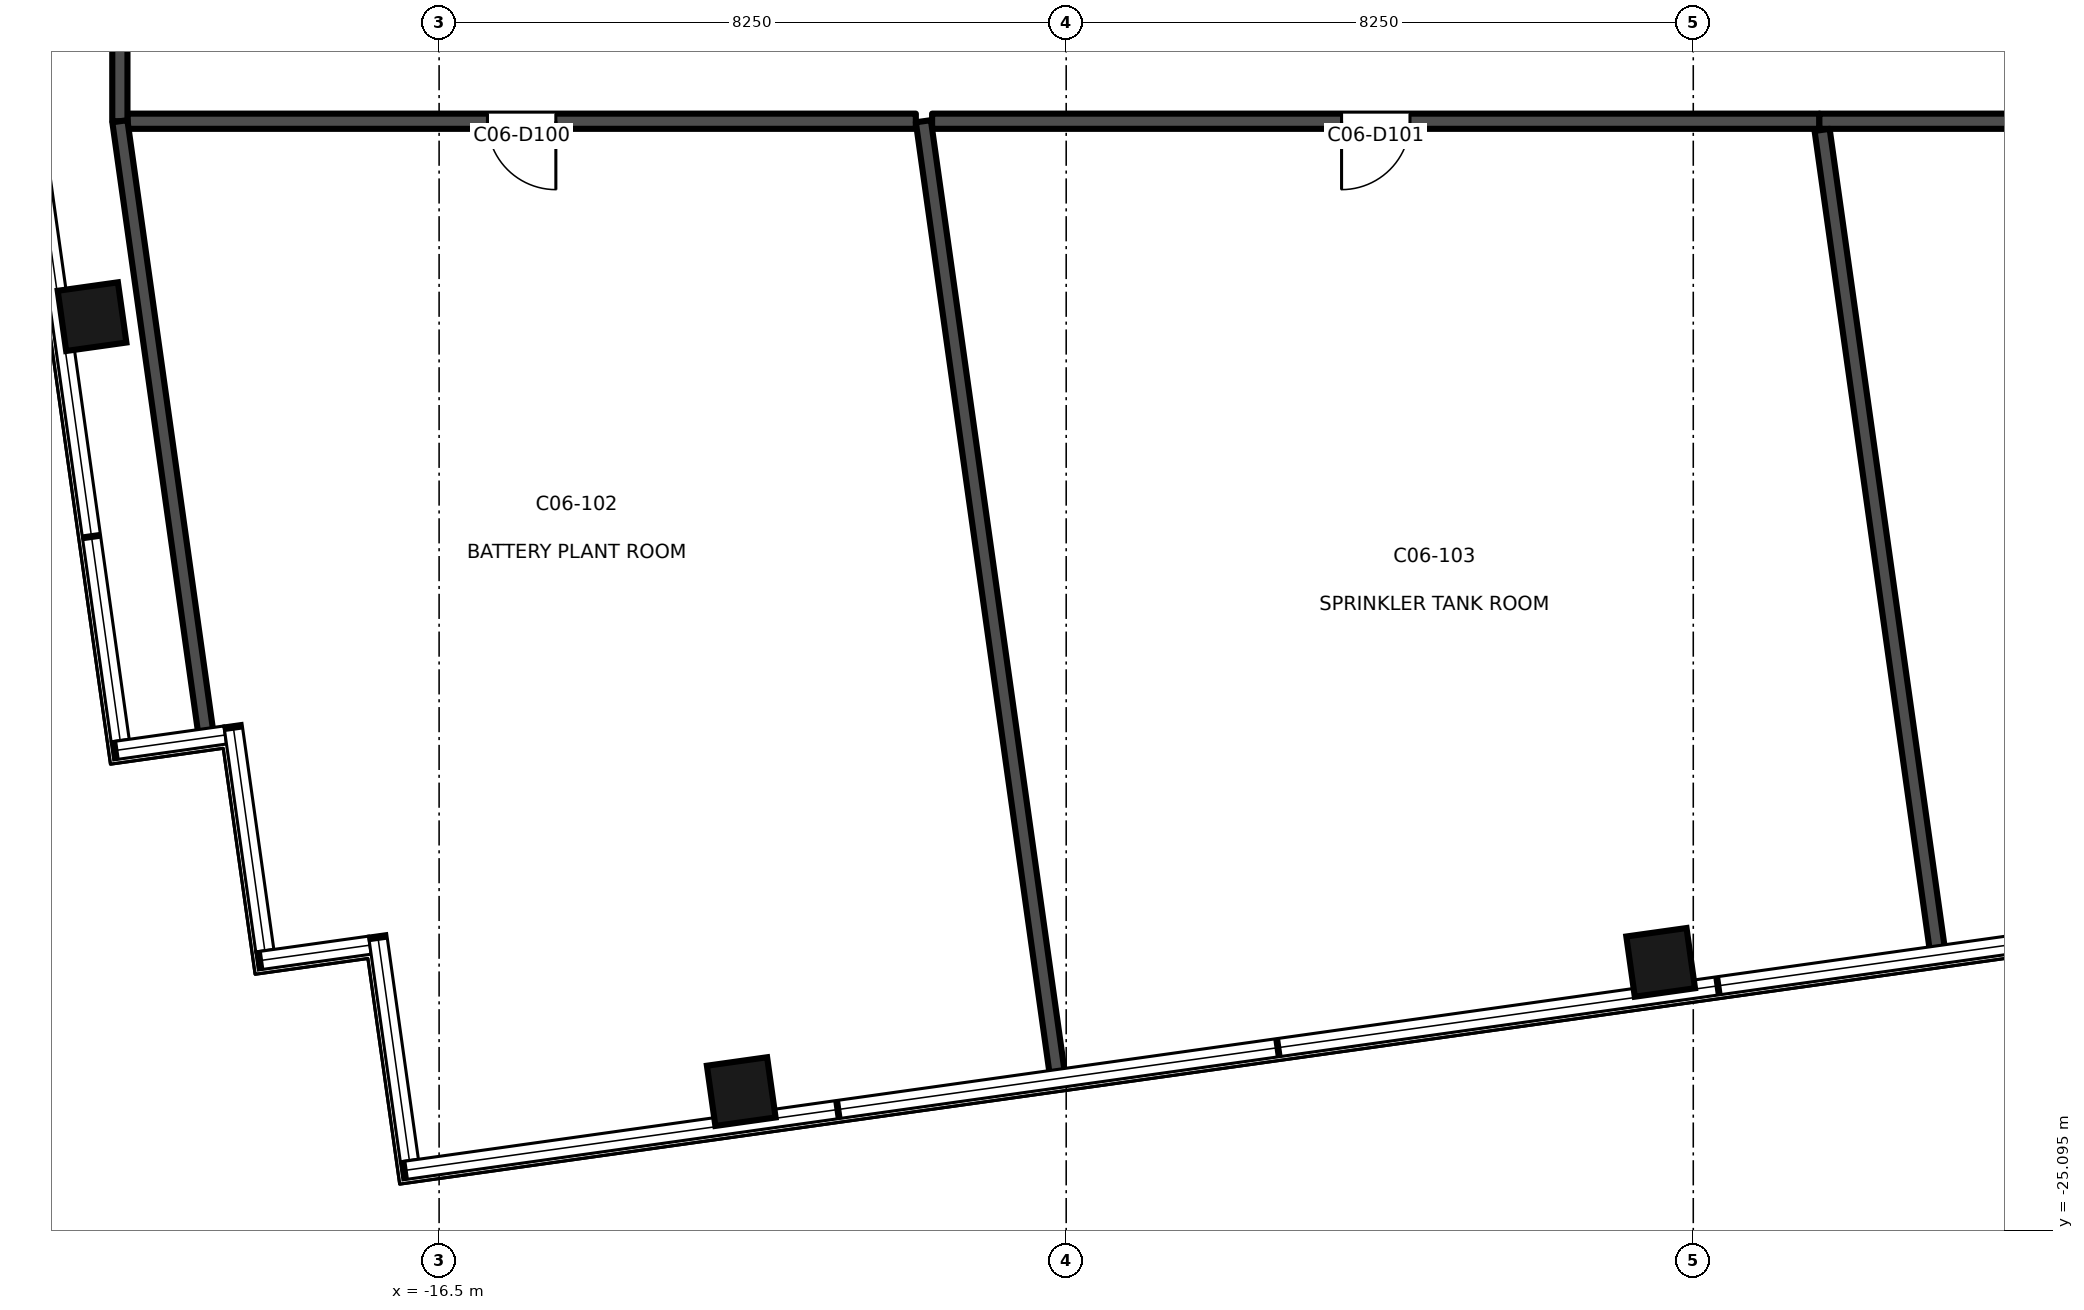
"""IFC4 building model, lengths in metres.
Left out: names, types, materials, properties, quantities, classifications, styles, units other than length and angle.
Written with IfcOpenShell. Run it as: python <this file> out.ifc"""

import sys

from ifc_helpers import new_model, si_unit, direction, frame, frame_2d, origin, origin_2d, place, context, subcontext, project, spatial, rectangle, extrude, element, fill, save


model = new_model("IFC4")
c1 = context("Model", 3, precision=1e-05, world=origin(), true_north=direction((0.0, 1.0)))
c2 = subcontext(c1, "Body", "Model", "MODEL_VIEW")
j1 = project(units=[si_unit("LENGTHUNIT", "METRE"), si_unit("PLANEANGLEUNIT", "RADIAN")], contexts=[c1])
p1 = place(None, origin())
s1 = spatial("IfcSite", under=j1, at=p1, CompositionType="ELEMENT")
p2 = place(p1, origin())
s2 = spatial("IfcBuilding", under=s1, at=p2, CompositionType="ELEMENT")
p3 = place(p2, frame((0.0, 0.0, 312.3)))
s3 = spatial("IfcBuildingStorey", under=s2, at=p3, CompositionType="ELEMENT", Elevation=312.3)
for number, where, z_axis, x_axis in (
    (1, (-12.525, -23.266, -0.2), (0.0, 0.0, 1.0), (0.99, 0.139, 0.0)),
    (2, (-0.429, -21.566, -0.2), (0.0, 0.0, 1.0), (0.99, 0.139, 0.0)),
    (3, (-21.066, -13.071, -0.2), (0.0, 0.0, 1.0), (-0.139, 0.99, 0.0)),
):
    element("IfcColumn", number, at=place(p3, frame(where, z_axis=z_axis, x_axis=x_axis)), inside=s3, PredefinedType="COLUMN", context=c2, shape_type="SweptSolid", body=[
        extrude(rectangle(XDim=0.8, YDim=0.8, at=origin_2d()), origin(), (0.0, 0.0, 1.0), 3.95),
    ])
p4 = place(p3, frame((-10.228, -10.5, 0.0), z_axis=(0.0, 0.0, 1.0), x_axis=(-1.0, 0.0, 0.0)))
e4 = element("IfcWall", 4, at=p4, inside=s3, PredefinedType="PARTITIONING", context=c2, shape_type="SweptSolid", body=[
    extrude(rectangle(XDim=10.372, YDim=0.2, at=frame_2d((5.186, 0.0))), origin(), (0.0, 0.0, 1.0), 3.75),
])
p5 = place(p4, frame((4.736, 0.0, 0.0)))
e5 = element("IfcOpeningElement", 5, at=p5, cuts=e4, PredefinedType="OPENING", context=c2, shape_type="SweptSolid", body=[
    extrude(rectangle(XDim=0.9, YDim=2.1, at=frame_2d((0.45, 1.05))), frame((0.0, 0.111, 0.0), z_axis=(0.0, -1.0, 0.0), x_axis=(1.0, 0.0, 0.0)), (0.0, 0.0, 1.0), 0.221),
])
p6 = place(p3, frame((1.659, -10.5, 0.0), z_axis=(0.0, 0.0, 1.0), x_axis=(-1.0, 0.0, 0.0)))
e6 = element("IfcWall", 6, at=p6, inside=s3, PredefinedType="PARTITIONING", context=c2, shape_type="SweptSolid", body=[
    extrude(rectangle(XDim=11.673, YDim=0.2, at=frame_2d((5.836, 0.0))), origin(), (0.0, 0.0, 1.0), 3.05),
])
p7 = place(p6, frame((5.386, 0.0, 0.0)))
e7 = element("IfcOpeningElement", 7, at=p7, cuts=e6, PredefinedType="OPENING", context=c2, shape_type="SweptSolid", body=[
    extrude(rectangle(XDim=0.9, YDim=2.1, at=frame_2d((0.45, 1.05))), frame((0.0, 0.111, 0.0), z_axis=(0.0, -1.0, 0.0), x_axis=(1.0, 0.0, 0.0)), (0.0, 0.0, 1.0), 0.221),
])
p8 = place(p3, frame((20.7, -10.5, 0.0), z_axis=(0.0, 0.0, 1.0), x_axis=(-1.0, 0.0, 0.0)))
e8 = element("IfcWall", 8, at=p8, inside=s3, PredefinedType="PARTITIONING", context=c2, shape_type="SweptSolid", body=[
    extrude(rectangle(XDim=19.041, YDim=0.2, at=frame_2d((9.521, 0.0))), origin(), (0.0, 0.0, 1.0), 3.14),
])
p9 = place(p8, frame((9.071, 0.0, 0.0)))
e9 = element("IfcOpeningElement", 9, at=p9, cuts=e8, PredefinedType="OPENING", context=c2, shape_type="SweptSolid", body=[
    extrude(rectangle(XDim=0.9, YDim=2.1, at=frame_2d((0.45, 1.05))), frame((0.0, 0.111, 0.0), z_axis=(0.0, -1.0, 0.0), x_axis=(1.0, 0.0, 0.0)), (0.0, 0.0, 1.0), 0.221),
])
p10 = place(p3, frame((-20.7, -10.5, 0.0), z_axis=(0.0, 0.0, 1.0), x_axis=(0.0, 1.0, 0.0)))
e10 = element("IfcWall", 10, at=p10, inside=s3, PredefinedType="PARTITIONING", context=c2, shape_type="SweptSolid", body=[
    extrude(rectangle(XDim=18.0, YDim=0.2, at=frame_2d((9.0, 0.0))), origin(), (0.0, 0.0, 1.0), 3.45),
])
p11 = place(p10, frame((8.55, 0.0, 0.0)))
e11 = element("IfcOpeningElement", 11, at=p11, cuts=e10, PredefinedType="OPENING", context=c2, shape_type="SweptSolid", body=[
    extrude(rectangle(XDim=0.9, YDim=2.1, at=frame_2d((0.45, 1.05))), frame((0.0, 0.111, 0.0), z_axis=(0.0, -1.0, 0.0), x_axis=(1.0, 0.0, 0.0)), (0.0, 0.0, 1.0), 0.221),
])
p12 = place(p3, frame((-10.129, -10.5, 0.0), z_axis=(0.0, 0.0, 1.0), x_axis=(0.139201510054, -0.990264075688, 0.0)))
e12 = element("IfcWall", 12, at=p12, inside=s3, PredefinedType="PARTITIONING", context=c2, shape_type="SweptSolid", body=[
    extrude(rectangle(XDim=12.628, YDim=0.2, at=frame_2d((6.314, 0.0))), origin(), (0.0, 0.0, 1.0), 3.05),
])
p13 = place(p3, frame((-19.573, -18.52, 0.0), z_axis=(0.0, 0.0, 1.0), x_axis=(-0.13915044451, 0.990271252634, 0.0)))
e13 = element("IfcWall", 13, at=p13, inside=s3, PredefinedType="PARTITIONING", context=c2, shape_type="SweptSolid", body=[
    extrude(rectangle(XDim=8.099, YDim=0.2, at=frame_2d((4.049, 0.0))), origin(), (0.0, 0.0, 1.0), 3.75),
])
p14 = place(p3, frame((1.695, -10.614, 0.0), z_axis=(0.0, 0.0, 1.0), x_axis=(0.139200796165, -0.990264176039, 0.0)))
e14 = element("IfcWall", 14, at=p14, inside=s3, PredefinedType="PARTITIONING", context=c2, shape_type="SweptSolid", body=[
    extrude(rectangle(XDim=10.869, YDim=0.2, at=frame_2d((5.434, 0.0))), origin(), (0.0, 0.0, 1.0), 3.75),
])
p15 = place(p5, origin())
e15 = element("IfcDoor", 15, at=p15, inside=s3, OperationType="SINGLE_SWING_LEFT", PredefinedType="DOOR", context=c2, shape_type="SweptSolid", body=[
    extrude(rectangle(XDim=0.9, YDim=2.1, at=frame_2d((0.45, 1.05))), frame((0.0, 0.025, 0.0), z_axis=(0.0, -1.0, 0.0), x_axis=(1.0, 0.0, 0.0)), (0.0, 0.0, 1.0), 0.05),
])
fill(e5, e15)
p16 = place(p7, origin())
e16 = element("IfcDoor", 16, at=p16, inside=s3, OperationType="SINGLE_SWING_RIGHT", PredefinedType="DOOR", context=c2, shape_type="SweptSolid", body=[
    extrude(rectangle(XDim=0.9, YDim=2.1, at=frame_2d((0.45, 1.05))), frame((0.0, 0.025, 0.0), z_axis=(0.0, -1.0, 0.0), x_axis=(1.0, 0.0, 0.0)), (0.0, 0.0, 1.0), 0.05),
])
fill(e7, e16)
save(model, sys.argv[1])
